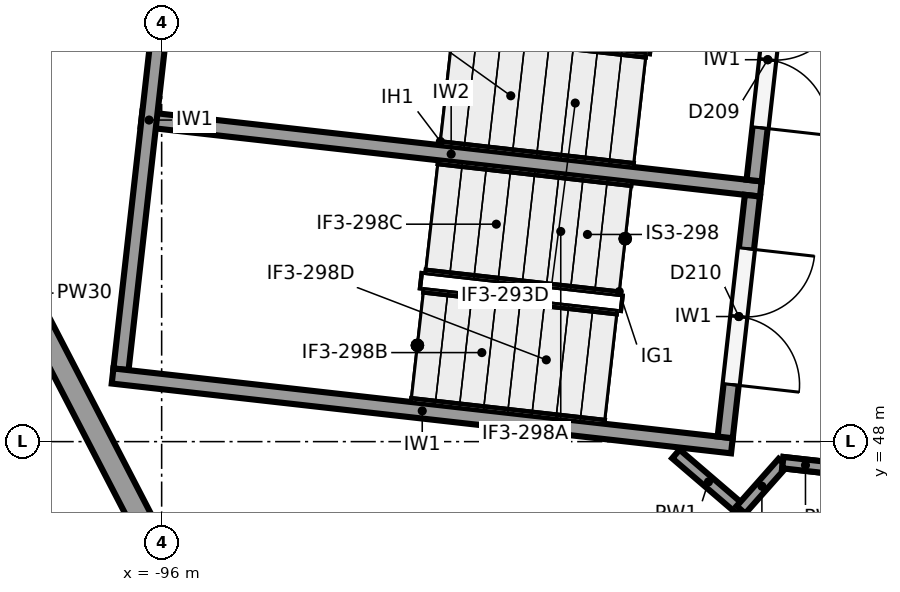
"""IFC4 building model, lengths in metres.
Left out: names, types, materials, properties, quantities, classifications, styles, units other than length and angle.
Written with IfcOpenShell. Run it as: python <this file> out.ifc"""

import sys

from ifc_helpers import new_model, si_unit, direction, frame, frame_2d, origin, place, context, subcontext, project, spatial, rectangle, extrude, element, fill, save


model = new_model("IFC4")
c1 = context("Model", 3, precision=1e-05, world=origin(), true_north=direction((0.0, 1.0)))
c2 = subcontext(c1, "Body", "Model", "MODEL_VIEW")
j1 = project(units=[si_unit("LENGTHUNIT", "METRE"), si_unit("PLANEANGLEUNIT", "RADIAN")], contexts=[c1])
p1 = place(None, origin())
s1 = spatial("IfcSite", under=j1, at=p1, CompositionType="ELEMENT")
p2 = place(p1, origin())
s2 = spatial("IfcBuilding", under=s1, at=p2, CompositionType="ELEMENT")
p3 = place(p2, frame((0.0, 0.0, 6.5)))
s3 = spatial("IfcBuildingStorey", under=s2, at=p3, CompositionType="ELEMENT", Elevation=6.5)
p4 = place(p3, frame((-94.807, 44.149, 0.0), z_axis=(0.0, 0.0, 1.0), x_axis=(-0.460021193284, 0.887907935391, 0.0)))
e1 = element("IfcWall", 1, at=p4, inside=s3, PredefinedType="SOLIDWALL", context=c2, shape_type="SweptSolid", body=[
    extrude(rectangle(XDim=13.075, YDim=0.3, at=frame_2d((6.538, 0.0))), origin(), (0.0, 0.0, 1.0), 3.85),
])
p5 = place(p3, frame((-96.646, 48.863, 0.0), z_axis=(0.0, 0.0, 1.0), x_axis=(0.993714104693, -0.111947658007, 0.0)))
e2 = element("IfcWall", 2, at=p5, inside=s3, PredefinedType="SHEAR", context=c2, shape_type="SweptSolid", body=[
    extrude(rectangle(XDim=8.2, YDim=0.2, at=frame_2d((4.1, 0.0))), origin(), (0.0, 0.0, 1.0), 5.15),
])
p6 = place(p3, frame((-95.796, 55.51, 0.0), z_axis=(0.0, 0.0, 1.0), x_axis=(-0.111970106426, -0.993711575492, 0.0)))
e3 = element("IfcWall", 3, at=p6, inside=s3, PredefinedType="SHEAR", context=c2, shape_type="SweptSolid", body=[
    extrude(rectangle(XDim=6.6, YDim=0.2, at=frame_2d((3.3, 0.0))), origin(), (0.0, 0.0, 1.0), 5.15),
])
p7 = place(p3, frame((-96.265, 52.242, 0.0), z_axis=(0.0, 0.0, 1.0), x_axis=(0.993713731549, -0.111950970206, 0.0)))
e4 = element("IfcWall", 4, at=p7, inside=s3, PredefinedType="SHEAR", context=c2, shape_type="SweptSolid", body=[
    extrude(rectangle(XDim=8.2, YDim=0.2, at=frame_2d((4.1, 0.0))), origin(), (0.0, 0.0, 1.0), 5.15),
])
p8 = place(p3, frame((-87.846, 54.614, 0.0), z_axis=(0.0, 0.0, 1.0), x_axis=(-0.112005735442, -0.993707560215, 0.0)))
e5 = element("IfcWall", 5, at=p8, inside=s3, PredefinedType="SHEAR", context=c2, shape_type="SweptSolid", body=[
    extrude(rectangle(XDim=3.2, YDim=0.2, at=frame_2d((1.6, 0.0))), origin(), (0.0, 0.0, 1.0), 5.15),
])
p9 = place(p8, frame((0.7, 0.0, 0.0)))
e6 = element("IfcOpeningElement", 6, at=p9, cuts=e5, PredefinedType="OPENING", context=c2, shape_type="SweptSolid", body=[
    extrude(rectangle(XDim=1.8, YDim=2.1, at=frame_2d((0.9, 1.05))), frame((0.0, 0.11, 0.0), z_axis=(0.0, -1.0, 0.0), x_axis=(1.0, 0.0, 0.0)), (0.0, 0.0, 1.0), 0.22),
])
p10 = place(p3, frame((-88.227, 51.236, 0.0), z_axis=(0.0, 0.0, 1.0), x_axis=(-0.111930393474, -0.993716049491, 0.0)))
e7 = element("IfcWall", 7, at=p10, inside=s3, PredefinedType="SHEAR", context=c2, shape_type="SweptSolid", body=[
    extrude(rectangle(XDim=3.2, YDim=0.2, at=frame_2d((1.6, 0.0))), origin(), (0.0, 0.0, 1.0), 5.15),
])
p11 = place(p10, frame((0.7, 0.0, 0.0)))
e8 = element("IfcOpeningElement", 8, at=p11, cuts=e7, PredefinedType="OPENING", context=c2, shape_type="SweptSolid", body=[
    extrude(rectangle(XDim=1.8, YDim=2.1, at=frame_2d((0.9, 1.05))), frame((0.0, 0.11, 0.0), z_axis=(0.0, -1.0, 0.0), x_axis=(1.0, 0.0, 0.0)), (0.0, 0.0, 1.0), 0.22),
])
p12 = place(p3, frame((-89.234, 47.837, 0.0), z_axis=(0.0, 0.0, 1.0), x_axis=(0.758950911089, -0.651147843855, 0.0)))
e9 = element("IfcWall", 9, at=p12, inside=s3, PredefinedType="PARTITIONING", context=c2, shape_type="SweptSolid", body=[
    extrude(rectangle(XDim=1.128, YDim=0.15, at=frame_2d((0.564, 0.0))), origin(), (0.0, 0.0, 1.0), 5.15),
])
p13 = place(p3, frame((-88.378, 47.103, 0.0), z_axis=(0.0, 0.0, 1.0), x_axis=(0.66330376879, 0.748350259109, 0.0)))
e10 = element("IfcWall", 10, at=p13, inside=s3, PredefinedType="PARTITIONING", context=c2, shape_type="SweptSolid", body=[
    extrude(rectangle(XDim=0.83, YDim=0.15, at=frame_2d((0.415, 0.0))), origin(), (0.0, 0.0, 1.0), 5.15),
])
p14 = place(p3, frame((-87.827, 47.724, 0.0), z_axis=(0.0, 0.0, 1.0), x_axis=(0.993708869306, -0.11199412066, 0.0)))
e11 = element("IfcWall", 11, at=p14, inside=s3, PredefinedType="PARTITIONING", context=c2, shape_type="SweptSolid", body=[
    extrude(rectangle(XDim=3.704, YDim=0.15, at=frame_2d((1.852, 0.0))), origin(), (0.0, 0.0, 1.0), 4.05),
])
p15 = place(p14, frame((0.65, 0.0, 0.0)))
e12 = element("IfcOpeningElement", 12, at=p15, cuts=e11, PredefinedType="OPENING", context=c2, shape_type="SweptSolid", body=[
    extrude(rectangle(XDim=1.8, YDim=2.1, at=frame_2d((0.9, 1.05))), frame((0.0, 0.085, 0.0), z_axis=(0.0, -1.0, 0.0), x_axis=(1.0, 0.0, 0.0)), (0.0, 0.0, 1.0), 0.17),
])
p16 = place(p3, frame((-87.827, 47.724, 4.05), z_axis=(0.0, 0.0, 1.0), x_axis=(0.993673547442, -0.112307083986, 0.0)))
e13 = element("IfcWall", 13, at=p16, inside=s3, PredefinedType="PARTITIONING", context=c2, shape_type="SweptSolid", body=[
    extrude(rectangle(XDim=0.6, YDim=0.15, at=frame_2d((0.3, 0.0))), origin(), (0.0, 0.0, 1.0), 1.1),
])
p17 = place(p9, origin())
e14 = element("IfcDoor", 14, at=p17, inside=s3, OperationType="DOUBLE_DOOR_SINGLE_SWING", PredefinedType="DOOR", context=c2, shape_type="SweptSolid", body=[
    extrude(rectangle(XDim=1.8, YDim=2.1, at=frame_2d((0.9, 1.05))), frame((0.0, 0.025, 0.0), z_axis=(0.0, -1.0, 0.0), x_axis=(1.0, 0.0, 0.0)), (0.0, 0.0, 1.0), 0.05),
])
fill(e6, e14)
p18 = place(p11, origin())
e15 = element("IfcDoor", 15, at=p18, inside=s3, OperationType="DOUBLE_DOOR_SINGLE_SWING", PredefinedType="DOOR", context=c2, shape_type="SweptSolid", body=[
    extrude(rectangle(XDim=1.8, YDim=2.1, at=frame_2d((0.9, 1.05))), frame((0.0, 0.025, 0.0), z_axis=(0.0, -1.0, 0.0), x_axis=(1.0, 0.0, 0.0)), (0.0, 0.0, 1.0), 0.05),
])
fill(e8, e15)
save(model, sys.argv[1])
